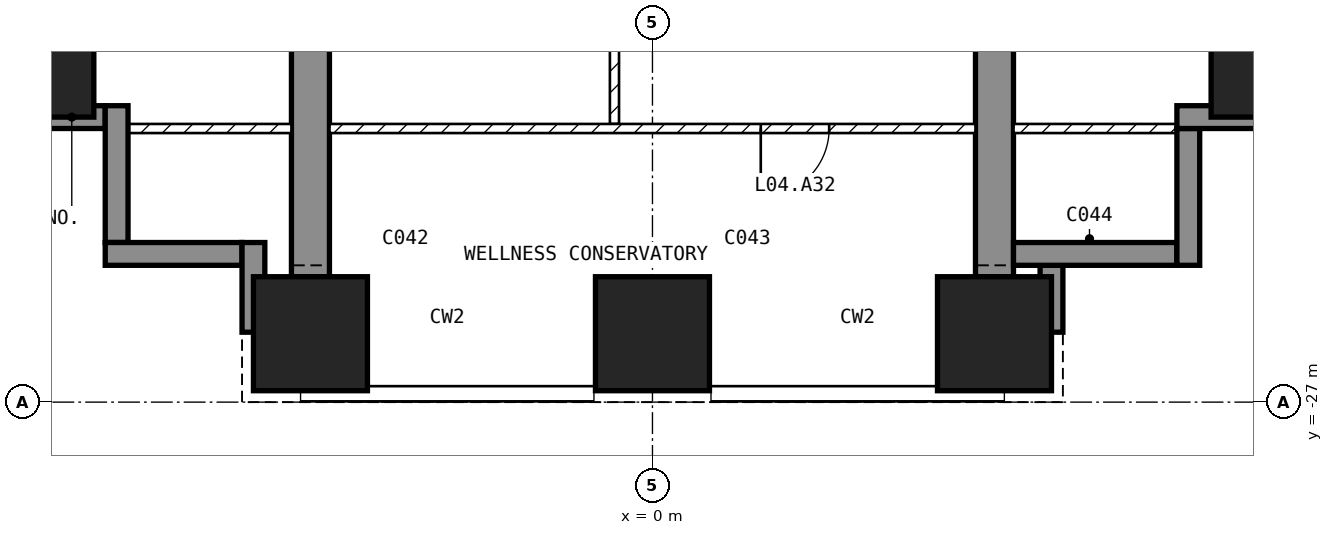
"""IFC4 building model, lengths in metres.
Left out: names, types, materials, properties, quantities, classifications, styles, units other than length and angle.
Written with IfcOpenShell. Run it as: python <this file> out.ifc"""

import sys

from ifc_helpers import new_model, si_unit, direction, frame, frame_2d, origin, origin_2d, place, context, subcontext, project, spatial, polyline, rectangle, outline, extrude, element, fill, save


model = new_model("IFC4")
c1 = context("Model", 3, precision=1e-05, world=origin(), true_north=direction((0.0, 1.0)))
c2 = subcontext(c1, "Body", "Model", "MODEL_VIEW")
j1 = project(units=[si_unit("LENGTHUNIT", "METRE"), si_unit("PLANEANGLEUNIT", "RADIAN")], contexts=[c1])
p1 = place(None, origin())
s1 = spatial("IfcSite", under=j1, at=p1, CompositionType="ELEMENT")
p2 = place(p1, origin())
s2 = spatial("IfcBuilding", under=s1, at=p2, CompositionType="ELEMENT")
p3 = place(p2, frame((0.0, 0.0, 32.0)))
s3 = spatial("IfcBuildingStorey", under=s2, at=p3, CompositionType="ELEMENT", Elevation=32.0)
for number, where, z_axis, x_axis in (
    (1, (-8.1, -22.5, -0.3), (0.0, 0.0, 1.0), (1.0, 0.0, 0.0)),
    (2, (-4.5, -26.1, -0.3), (0.0, 0.0, 1.0), (1.0, 0.0, 0.0)),
    (3, (0.0, -26.1, -0.3), (0.0, 0.0, 1.0), (1.0, 0.0, 0.0)),
    (4, (4.5, -26.1, -0.3), (0.0, 0.0, 1.0), (1.0, 0.0, 0.0)),
    (5, (8.1, -22.5, -0.3), (0.0, 0.0, 1.0), (1.0, 0.0, 0.0)),
):
    element("IfcColumn", number, at=place(p3, frame(where, z_axis=z_axis, x_axis=x_axis)), inside=s3, PredefinedType="COLUMN", context=c2, shape_type="SweptSolid", body=[
        extrude(rectangle(XDim=1.5, YDim=1.5, at=origin_2d()), origin(), (0.0, 0.0, 1.0), 4.55),
    ])
for number, where, z_axis, x_axis in (
    (6, (-4.75, -25.35, -0.3), (1.0, 0.0, 0.0), (0.0, 1.0, 0.0)),
    (7, (4.25, -25.35, -0.3), (1.0, 0.0, 0.0), (0.0, 1.0, 0.0)),
):
    element("IfcWall", number, at=place(p3, frame(where, z_axis=z_axis, x_axis=x_axis)), inside=s3, PredefinedType="SHEAR", context=c2, shape_type="SweptSolid", body=[
        extrude(outline(polyline([(0.0, 0.0), (4.05, 0.0), (4.05, 2.7), (6.45, 2.7), (6.45, 0.0), (11.85, 0.0), (11.85, 2.7), (14.25, 2.7), (14.25, 0.0), (16.35, 0.0), (16.35, 4.55), (0.0, 4.55), (0.0, 0.0)])), origin(), (0.0, 0.0, 1.0), 0.5),
    ])
p4 = place(p3, frame((5.25, -26.08, 0.0), z_axis=(0.0, 0.0, 1.0), x_axis=(0.0, 1.0, 0.0)))
e8 = element("IfcWall", 8, at=p4, inside=s3, PredefinedType="SOLIDWALL", context=c2, shape_type="SweptSolid", body=[
    extrude(rectangle(XDim=0.88, YDim=0.3, at=frame_2d((0.44, 0.0))), origin(), (0.0, 0.0, 1.0), 4.25),
])
p5 = place(p3, frame((4.75, -25.05, 0.0), z_axis=(0.0, 0.0, 1.0), x_axis=(1.0, 0.0, 0.0)))
e9 = element("IfcWall", 9, at=p5, inside=s3, PredefinedType="SOLIDWALL", context=c2, shape_type="SweptSolid", body=[
    extrude(rectangle(XDim=2.15, YDim=0.3, at=frame_2d((1.075, 0.0))), origin(), (0.0, 0.0, 1.0), 4.25),
])
p6 = place(p3, frame((7.05, -25.2, 0.0), z_axis=(0.0, 0.0, 1.0), x_axis=(0.0, 1.0, 0.0)))
e10 = element("IfcWall", 10, at=p6, inside=s3, PredefinedType="SOLIDWALL", context=c2, shape_type="SweptSolid", body=[
    extrude(rectangle(XDim=1.8, YDim=0.3, at=frame_2d((0.9, 0.0))), origin(), (0.0, 0.0, 1.0), 4.25),
])
p7 = place(p3, frame((6.9, -23.25, 0.0), z_axis=(0.0, 0.0, 1.0), x_axis=(1.0, 0.0, 0.0)))
e11 = element("IfcWall", 11, at=p7, inside=s3, PredefinedType="SOLIDWALL", context=c2, shape_type="SweptSolid", body=[
    extrude(rectangle(XDim=1.18, YDim=0.3, at=frame_2d((0.59, 0.0))), origin(), (0.0, 0.0, 1.0), 4.25),
])
p8 = place(p3, frame((-8.08, -23.25, 0.0), z_axis=(0.0, 0.0, 1.0), x_axis=(1.0, 0.0, 0.0)))
e12 = element("IfcWall", 12, at=p8, inside=s3, PredefinedType="SOLIDWALL", context=c2, shape_type="SweptSolid", body=[
    extrude(rectangle(XDim=0.88, YDim=0.3, at=frame_2d((0.44, 0.0))), origin(), (0.0, 0.0, 1.0), 4.25),
])
p9 = place(p3, frame((-7.05, -23.1, 0.0), z_axis=(0.0, 0.0, 1.0), x_axis=(0.0, -1.0, 0.0)))
e13 = element("IfcWall", 13, at=p9, inside=s3, PredefinedType="SOLIDWALL", context=c2, shape_type="SweptSolid", body=[
    extrude(rectangle(XDim=1.8, YDim=0.3, at=frame_2d((0.9, 0.0))), origin(), (0.0, 0.0, 1.0), 4.25),
])
p10 = place(p3, frame((-7.2, -25.05, 0.0), z_axis=(0.0, 0.0, 1.0), x_axis=(1.0, 0.0, 0.0)))
e14 = element("IfcWall", 14, at=p10, inside=s3, PredefinedType="SOLIDWALL", context=c2, shape_type="SweptSolid", body=[
    extrude(rectangle(XDim=1.8, YDim=0.3, at=frame_2d((0.9, 0.0))), origin(), (0.0, 0.0, 1.0), 4.25),
])
p11 = place(p3, frame((-5.25, -24.9, 0.0), z_axis=(0.0, 0.0, 1.0), x_axis=(0.0, -1.0, 0.0)))
e15 = element("IfcWall", 15, at=p11, inside=s3, PredefinedType="SOLIDWALL", context=c2, shape_type="SweptSolid", body=[
    extrude(rectangle(XDim=1.18, YDim=0.3, at=frame_2d((0.59, 0.0))), origin(), (0.0, 0.0, 1.0), 4.25),
])
p12 = place(p3, frame((-0.5, -23.34, 0.0), z_axis=(0.0, 0.0, 1.0), x_axis=(0.0, 1.0, 0.0)))
e16 = element("IfcWall", 16, at=p12, inside=s3, PredefinedType="PARTITIONING", context=c2, shape_type="SweptSolid", body=[
    extrude(rectangle(XDim=4.38, YDim=0.12, at=frame_2d((2.19, 0.0))), origin(), (0.0, 0.0, 1.0), 4.25),
])
p13 = place(p12, frame((1.74, 0.0, 0.0)))
e17 = element("IfcOpeningElement", 17, at=p13, cuts=e16, PredefinedType="OPENING", context=c2, shape_type="SweptSolid", body=[
    extrude(rectangle(XDim=0.9, YDim=2.1, at=frame_2d((0.45, 1.05))), frame((0.0, 0.07, 0.0), z_axis=(0.0, -1.0, 0.0), x_axis=(1.0, 0.0, 0.0)), (0.0, 0.0, 1.0), 0.14),
])
p14 = place(p3, frame((4.25, -23.4, 0.0), z_axis=(0.0, 0.0, 1.0), x_axis=(-1.0, 0.0, 0.0)))
e18 = element("IfcWall", 18, at=p14, inside=s3, PredefinedType="PARTITIONING", context=c2, shape_type="SweptSolid", body=[
    extrude(rectangle(XDim=8.5, YDim=0.12, at=frame_2d((4.25, 0.0))), origin(), (0.0, 0.0, 1.0), 4.25),
])
p15 = place(p14, frame((1.925, 0.0, 0.0)))
e19 = element("IfcOpeningElement", 19, at=p15, cuts=e18, PredefinedType="OPENING", context=c2, shape_type="SweptSolid", body=[
    extrude(rectangle(XDim=0.9, YDim=2.1, at=frame_2d((0.45, 1.05))), frame((0.0, 0.07, 0.0), z_axis=(0.0, -1.0, 0.0), x_axis=(1.0, 0.0, 0.0)), (0.0, 0.0, 1.0), 0.14),
])
for number, where, z_axis, x_axis in (
    (20, (7.12, -23.4, 0.0), (0.0, 0.0, 1.0), (-1.0, 0.0, 0.0)),
    (21, (-4.75, -23.4, 0.0), (0.0, 0.0, 1.0), (-1.0, 0.0, 0.0)),
):
    element("IfcWall", number, at=place(p3, frame(where, z_axis=z_axis, x_axis=x_axis)), inside=s3, PredefinedType="PARTITIONING", context=c2, shape_type="SweptSolid", body=[
        extrude(rectangle(XDim=2.37, YDim=0.12, at=frame_2d((1.185, 0.0))), origin(), (0.0, 0.0, 1.0), 4.25),
    ])
p16 = place(p15, origin())
e22 = element("IfcDoor", 22, at=p16, inside=s3, OperationType="SINGLE_SWING_RIGHT", PredefinedType="DOOR", context=c2, shape_type="SweptSolid", body=[
    extrude(rectangle(XDim=0.9, YDim=2.1, at=frame_2d((0.45, 1.05))), frame((0.0, 0.025, 0.0), z_axis=(0.0, -1.0, 0.0), x_axis=(1.0, 0.0, 0.0)), (0.0, 0.0, 1.0), 0.05),
])
fill(e19, e22)
save(model, sys.argv[1])
